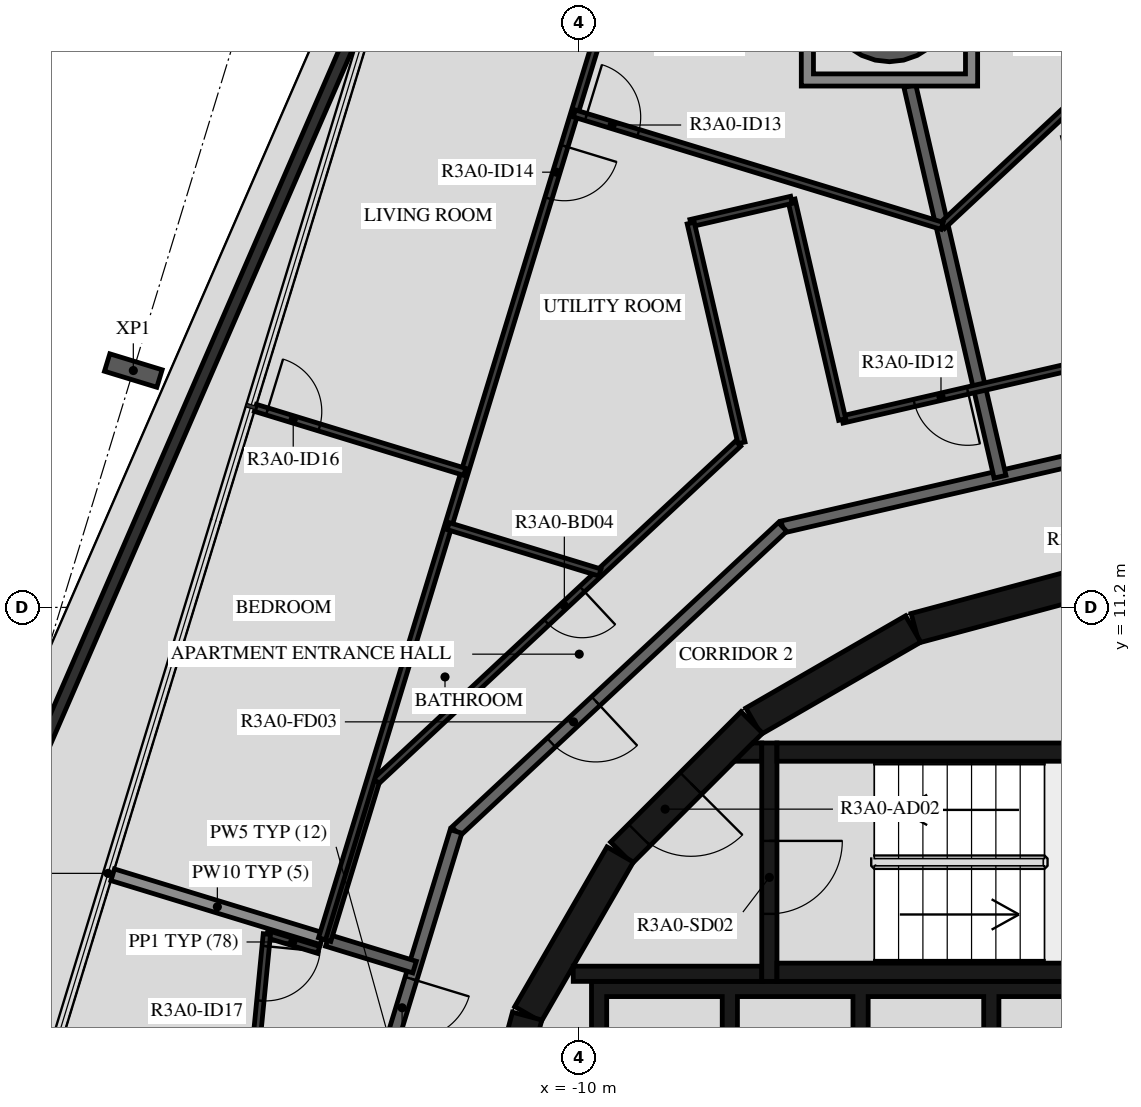
"""IFC4 building model, lengths in metres.
Left out: names, types, materials, properties, quantities, classifications, styles, units other than length and angle.
Written with IfcOpenShell. Run it as: python <this file> out.ifc"""

import sys

from ifc_helpers import new_model, si_unit, direction, frame, frame_2d, origin, origin_2d, place, context, subcontext, project, spatial, polyline, rectangle, hollow_circle, i_section, outline, extrude, element, fill, save


model = new_model("IFC4")
c1 = context("Model", 3, precision=1e-05, world=origin(), true_north=direction((0.0, 1.0)))
c2 = subcontext(c1, "Body", "Model", "MODEL_VIEW")
j1 = project(units=[si_unit("LENGTHUNIT", "METRE"), si_unit("PLANEANGLEUNIT", "RADIAN")], contexts=[c1])
p1 = place(None, origin())
s1 = spatial("IfcSite", under=j1, at=p1, CompositionType="ELEMENT")
p2 = place(p1, origin())
s2 = spatial("IfcBuilding", under=s1, at=p2, CompositionType="ELEMENT")
p3 = place(p2, frame((0.0, 0.0, 113.4)))
s3 = spatial("IfcBuildingStorey", under=s2, at=p3, CompositionType="ELEMENT", Elevation=113.4)
p4 = place(p3, frame((-4.9, 21.223, -0.45), z_axis=(0.0, 0.0, 1.0), x_axis=(1.0, 0.0, 0.0)))
e1 = element("IfcColumn", 1, at=p4, inside=s3, PredefinedType="COLUMN", context=c2, shape_type="SweptSolid", body=[
    extrude(hollow_circle(Radius=1.05, WallThickness=0.05, at=origin_2d()), origin(), (0.0, 0.0, 1.0), 3.57),
])
p5 = place(p3, frame((-17.335, 15.095, -0.45), z_axis=(0.0, 0.0, 1.0), x_axis=(0.29237190653, 0.956304694264, 0.0)))
e2 = element("IfcColumn", 2, at=p5, inside=s3, PredefinedType="COLUMN", context=c2, shape_type="SweptSolid", body=[
    extrude(i_section(OverallWidth=0.3, OverallDepth=0.9, WebThickness=0.019, FlangeThickness=0.035, FilletRadius=0.03, at=origin_2d()), origin(), (0.0, 0.0, 1.0), 3.57),
])
p6 = place(p3, frame((-26.845, -9.558, 0.03), z_axis=(0.0, 0.0, 1.0), x_axis=(0.398491196924, 0.917172157217, 0.0)))
e3 = element("IfcWall", 3, at=p6, inside=s3, PredefinedType="PARAPET", context=c2, shape_type="SweptSolid", body=[
    extrude(rectangle(XDim=35.306, YDim=0.2, at=frame_2d((17.653, 0.0))), origin(), (0.0, 0.0, 1.0), 1.5),
])
for number, where, z_axis, x_axis in (
    (4, (-1.55, 11.643, 0.0), (0.0, 0.0, 1.0), (-0.966, -0.259, 0.0)),
    (5, (-4.51, 10.845, 0.0), (0.0, 0.0, 1.0), (-0.866, -0.5, 0.0)),
):
    element("IfcWall", number, at=place(p3, frame(where, z_axis=z_axis, x_axis=x_axis)), inside=s3, PredefinedType="SHEAR", context=c2, shape_type="SweptSolid", body=[
        extrude(rectangle(XDim=3.033, YDim=0.5, at=frame_2d((1.516, 0.0))), origin(), (0.0, 0.0, 1.0), 3.12),
    ])
p7 = place(p3, frame((-7.164, 9.308, 0.0), z_axis=(0.0, 0.0, 1.0), x_axis=(-0.707106781187, -0.707106781187, 0.0)))
e6 = element("IfcWall", 6, at=p7, inside=s3, PredefinedType="SHEAR", context=c2, shape_type="SweptSolid", body=[
    extrude(rectangle(XDim=3.032, YDim=0.5, at=frame_2d((1.516, 0.0))), origin(), (0.0, 0.0, 1.0), 3.12),
])
p8 = place(p7, frame((1.416, 0.0, 0.0)))
e7 = element("IfcOpeningElement", 7, at=p8, cuts=e6, PredefinedType="OPENING", context=c2, shape_type="SweptSolid", body=[
    extrude(rectangle(XDim=1.2, YDim=2.1, at=frame_2d((0.6, 1.05))), frame((0.0, 0.26, 0.0), z_axis=(0.0, -1.0, 0.0), x_axis=(1.0, 0.0, 0.0)), (0.0, 0.0, 1.0), 0.52),
])
for number, where, z_axis, x_axis in (
    (8, (-9.329, 7.137, 0.0), (0.0, 0.0, 1.0), (-0.5, -0.866, 0.0)),
    (9, (-10.858, 4.479, 0.0), (0.0, 0.0, 1.0), (-0.259, -0.966, 0.0)),
):
    element("IfcWall", number, at=place(p3, frame(where, z_axis=z_axis, x_axis=x_axis)), inside=s3, PredefinedType="SHEAR", context=c2, shape_type="SweptSolid", body=[
        extrude(rectangle(XDim=3.033, YDim=0.5, at=frame_2d((1.516, 0.0))), origin(), (0.0, 0.0, 1.0), 3.12),
    ])
for number, where, z_axis, x_axis in (
    (10, (-6.75, 5.2, 0.0), (0.0, 0.0, 1.0), (1.0, 0.0, 0.0)),
    (11, (-6.75, 8.82, 0.0), (0.0, 0.0, 1.0), (1.0, 0.0, 0.0)),
):
    element("IfcWall", number, at=place(p3, frame(where, z_axis=z_axis, x_axis=x_axis)), inside=s3, PredefinedType="SHEAR", context=c2, shape_type="SweptSolid", body=[
        extrude(rectangle(XDim=6.75, YDim=0.3, at=frame_2d((3.375, 0.0))), origin(), (0.0, 0.0, 1.0), 3.12),
    ])
p9 = place(p3, frame((-6.875, 8.97, 0.0), z_axis=(0.0, 0.0, 1.0), x_axis=(0.0, -1.0, 0.0)))
e12 = element("IfcWall", 12, at=p9, inside=s3, PredefinedType="SHEAR", context=c2, shape_type="SweptSolid", body=[
    extrude(rectangle(XDim=3.92, YDim=0.25, at=frame_2d((1.96, 0.0))), origin(), (0.0, 0.0, 1.0), 3.12),
])
p10 = place(p9, frame((1.61, 0.0, 0.0)))
e13 = element("IfcOpeningElement", 13, at=p10, cuts=e12, PredefinedType="OPENING", context=c2, shape_type="SweptSolid", body=[
    extrude(rectangle(XDim=1.2, YDim=2.1, at=frame_2d((0.6, 1.05))), frame((0.0, 0.135, 0.0), z_axis=(0.0, -1.0, 0.0), x_axis=(1.0, 0.0, 0.0)), (0.0, 0.0, 1.0), 0.27),
])
p11 = place(p3, frame((-7.0, 5.175, 0.0), z_axis=(0.0, 0.0, 1.0), x_axis=(-1.0, 0.0, 0.0)))
e14 = element("IfcWall", 14, at=p11, inside=s3, PredefinedType="SHEAR", context=c2, shape_type="SweptSolid", body=[
    extrude(rectangle(XDim=3.1, YDim=0.25, at=frame_2d((1.55, 0.0))), origin(), (0.0, 0.0, 1.0), 3.12),
])
p12 = place(p3, origin())
e15 = element("IfcWall", 15, at=p12, inside=s3, PredefinedType="SHEAR", context=c2, shape_type="SweptSolid", body=[
    extrude(outline(polyline([(-7.148, 8.97), (-7.0, 8.97), (-7.0, 8.67), (-7.448, 8.67), (-7.148, 8.97)])), origin(), (0.0, 0.0, 1.0), 3.12),
])
p13 = place(p3, origin())
e16 = element("IfcWall", 16, at=p13, inside=s3, PredefinedType="SHEAR", context=c2, shape_type="SweptSolid", body=[
    extrude(outline(polyline([(-9.55, 4.8), (-7.65, 4.8), (-7.65, 1.9), (-7.4, 1.9), (-7.4, 4.8), (-5.5, 4.8), (-5.5, 1.9), (-5.25, 1.9), (-5.25, 4.8), (-3.35, 4.8), (-3.35, 1.9), (-3.1, 1.9), (-3.1, 4.8), (-1.2, 4.8), (-1.2, 1.9), (-0.95, 1.9), (-0.95, 4.8), (0.95, 4.8), (0.95, 1.9), (1.2, 1.9), (1.2, 4.8), (3.1, 4.8), (3.1, 1.9), (3.35, 1.9), (3.35, 4.8), (5.25, 4.8), (5.25, 1.9), (5.5, 1.9), (5.5, 4.8), (7.4, 4.8), (7.4, 1.9), (7.65, 1.9), (7.65, 4.8), (9.55, 4.8), (9.55, 1.9), (9.8, 1.9), (9.8, 4.8), (9.8, 5.05), (-9.8, 5.05), (-9.8, 4.8), (-9.8, 1.9), (-9.55, 1.9), (-9.55, 4.8)])), origin(), (0.0, 0.0, 1.0), 3.12),
])
p14 = place(p3, frame((0.495, 14.175, 0.0), z_axis=(0.0, 0.0, 1.0), x_axis=(-0.974376622151, -0.224922649383, 0.0)))
e17 = element("IfcWall", 17, at=p14, inside=s3, PredefinedType="STANDARD", context=c2, shape_type="SweptSolid", body=[
    extrude(rectangle(XDim=7.342, YDim=0.2, at=frame_2d((3.671, 0.0))), origin(), (0.0, 0.0, 1.0), 3.12),
])
p15 = place(p3, frame((-6.659, 12.523, 0.0), z_axis=(0.0, 0.0, 1.0), x_axis=(-0.731350455479, -0.682001841105, 0.0)))
e18 = element("IfcWall", 18, at=p15, inside=s3, PredefinedType="STANDARD", context=c2, shape_type="SweptSolid", body=[
    extrude(rectangle(XDim=7.342, YDim=0.2, at=frame_2d((3.671, 0.0))), origin(), (0.0, 0.0, 1.0), 3.12),
])
p16 = place(p15, frame((4.2, 0.0, 0.0)))
e19 = element("IfcOpeningElement", 19, at=p16, cuts=e18, PredefinedType="OPENING", context=c2, shape_type="SweptSolid", body=[
    extrude(rectangle(XDim=1.0, YDim=2.1, at=frame_2d((0.5, 1.05))), frame((0.0, 0.11, 0.0), z_axis=(0.0, -1.0, 0.0), x_axis=(1.0, 0.0, 0.0)), (0.0, 0.0, 1.0), 0.22),
])
p17 = place(p3, frame((-12.028, 7.516, 0.0), z_axis=(0.0, 0.0, 1.0), x_axis=(-0.292365533182, -0.956306642771, 0.0)))
e20 = element("IfcWall", 20, at=p17, inside=s3, PredefinedType="STANDARD", context=c2, shape_type="SweptSolid", body=[
    extrude(rectangle(XDim=7.342, YDim=0.2, at=frame_2d((3.671, 0.0))), origin(), (0.0, 0.0, 1.0), 3.12),
])
p18 = place(p17, frame((2.533, 0.0, 0.0)))
e21 = element("IfcOpeningElement", 21, at=p18, cuts=e20, PredefinedType="OPENING", context=c2, shape_type="SweptSolid", body=[
    extrude(rectangle(XDim=1.0, YDim=2.1, at=frame_2d((0.5, 1.05))), frame((0.0, 0.11, 0.0), z_axis=(0.0, -1.0, 0.0), x_axis=(1.0, 0.0, 0.0)), (0.0, 0.0, 1.0), 0.22),
])
p19 = place(p3, frame((-4.565, 19.773, 0.0), z_axis=(0.0, 0.0, 1.0), x_axis=(0.224940633072, -0.974372470667, 0.0)))
e22 = element("IfcWall", 22, at=p19, inside=s3, PredefinedType="STANDARD", context=c2, shape_type="SweptSolid", body=[
    extrude(rectangle(XDim=6.594, YDim=0.2, at=frame_2d((3.297, 0.0))), origin(), (0.0, 0.0, 1.0), 3.12),
])
p20 = place(p3, frame((-14.145, 5.724, 0.0), z_axis=(0.0, 0.0, 1.0), x_axis=(0.956266872747, -0.292495586439, 0.0)))
e23 = element("IfcWall", 23, at=p20, inside=s3, PredefinedType="STANDARD", context=c2, shape_type="SweptSolid", body=[
    extrude(rectangle(XDim=1.5, YDim=0.2, at=frame_2d((0.75, 0.0))), origin(), (0.0, 0.0, 1.0), 3.12),
])
p21 = place(p3, frame((-17.674, 6.803, 0.0), z_axis=(0.0, 0.0, 1.0), x_axis=(0.956293645939, -0.292408041504, 0.0)))
e24 = element("IfcWall", 24, at=p21, inside=s3, PredefinedType="STANDARD", context=c2, shape_type="SweptSolid", body=[
    extrude(rectangle(XDim=3.6, YDim=0.2, at=frame_2d((1.8, 0.0))), origin(), (0.0, 0.0, 1.0), 2.73),
])
p22 = place(p3, frame((-1.161, 15.332, 0.0), z_axis=(0.0, 0.0, 1.0), x_axis=(-0.974373440078, -0.224936433845, 0.0)))
e25 = element("IfcWall", 25, at=p22, inside=s3, PredefinedType="PARTITIONING", context=c2, shape_type="SweptSolid", body=[
    extrude(rectangle(XDim=4.636, YDim=0.12, at=frame_2d((2.318, 0.0))), origin(), (0.0, 0.0, 1.0), 3.12),
])
p23 = place(p22, frame((2.518, 0.0, 0.0)))
e26 = element("IfcOpeningElement", 26, at=p23, cuts=e25, PredefinedType="OPENING", context=c2, shape_type="SweptSolid", body=[
    extrude(rectangle(XDim=0.9, YDim=2.1, at=frame_2d((0.45, 1.05))), frame((0.0, 0.07, 0.0), z_axis=(0.0, -1.0, 0.0), x_axis=(1.0, 0.0, 0.0)), (0.0, 0.0, 1.0), 0.14),
])
p24 = place(p3, frame((0.591, 21.787, 0.0), z_axis=(0.0, 0.0, 1.0), x_axis=(-0.731363296574, -0.681988070588, 0.0)))
e27 = element("IfcWall", 27, at=p24, inside=s3, PredefinedType="PARTITIONING", context=c2, shape_type="SweptSolid", body=[
    extrude(rectangle(XDim=6.324, YDim=0.12, at=frame_2d((3.162, 0.0))), origin(), (0.0, 0.0, 1.0), 3.12),
])
p25 = place(p24, frame((0.6, 0.0, 0.0)))
e28 = element("IfcOpeningElement", 28, at=p25, cuts=e27, PredefinedType="OPENING", context=c2, shape_type="SweptSolid", body=[
    extrude(rectangle(XDim=0.9, YDim=2.1, at=frame_2d((0.45, 1.05))), frame((0.0, 0.07, 0.0), z_axis=(0.0, -1.0, 0.0), x_axis=(1.0, 0.0, 0.0)), (0.0, 0.0, 1.0), 0.14),
])
p26 = place(p3, frame((-5.677, 14.289, 0.0), z_axis=(0.0, 0.0, 1.0), x_axis=(-0.224960478174, 0.974367889075, 0.0)))
e29 = element("IfcWall", 29, at=p26, inside=s3, PredefinedType="PARTITIONING", context=c2, shape_type="SweptSolid", body=[
    extrude(rectangle(XDim=3.708, YDim=0.12, at=frame_2d((1.854, 0.0))), origin(), (0.0, 0.0, 1.0), 3.12),
])
p27 = place(p3, frame((-6.512, 17.902, 0.0), z_axis=(0.0, 0.0, 1.0), x_axis=(-0.974376669418, -0.224922444621, 0.0)))
e30 = element("IfcWall", 30, at=p27, inside=s3, PredefinedType="PARTITIONING", context=c2, shape_type="SweptSolid", body=[
    extrude(rectangle(XDim=1.7, YDim=0.12, at=frame_2d((0.85, 0.0))), origin(), (0.0, 0.0, 1.0), 3.12),
])
p28 = place(p3, frame((-8.168, 17.52, 0.0), z_axis=(0.0, 0.0, 1.0), x_axis=(0.224960478174, -0.974367889075, 0.0)))
e31 = element("IfcWall", 31, at=p28, inside=s3, PredefinedType="PARTITIONING", context=c2, shape_type="SweptSolid", body=[
    extrude(rectangle(XDim=3.708, YDim=0.12, at=frame_2d((1.854, 0.0))), origin(), (0.0, 0.0, 1.0), 3.12),
])
p29 = place(p3, frame((-7.388, 13.894, 0.0), z_axis=(0.0, 0.0, 1.0), x_axis=(-0.731357186721, -0.681994622729, 0.0)))
e32 = element("IfcWall", 32, at=p29, inside=s3, PredefinedType="PARTITIONING", context=c2, shape_type="SweptSolid", body=[
    extrude(rectangle(XDim=8.146, YDim=0.12, at=frame_2d((4.073, 0.0))), origin(), (0.0, 0.0, 1.0), 3.12),
])
p30 = place(p29, frame((3.509, 0.0, 0.0)))
e33 = element("IfcOpeningElement", 33, at=p30, cuts=e32, PredefinedType="OPENING", context=c2, shape_type="SweptSolid", body=[
    extrude(rectangle(XDim=0.8, YDim=2.1, at=frame_2d((0.4, 1.05))), frame((0.0, 0.07, 0.0), z_axis=(0.0, -1.0, 0.0), x_axis=(1.0, 0.0, 0.0)), (0.0, 0.0, 1.0), 0.14),
])
p31 = place(p3, frame((-13.345, 8.339, 0.0), z_axis=(0.0, 0.0, 1.0), x_axis=(-0.292316072367, -0.956321762712, 0.0)))
e34 = element("IfcWall", 34, at=p31, inside=s3, PredefinedType="PARTITIONING", context=c2, shape_type="SweptSolid", body=[
    extrude(rectangle(XDim=2.734, YDim=0.12, at=frame_2d((1.367, 0.0))), origin(), (0.0, 0.0, 1.0), 3.12),
])
p32 = place(p3, frame((-9.169, 22.31, 0.0), z_axis=(0.0, 0.0, 1.0), x_axis=(-0.29236145486, -0.956307889601, 0.0)))
e35 = element("IfcWall", 35, at=p32, inside=s3, PredefinedType="PARTITIONING", context=c2, shape_type="SweptSolid", body=[
    extrude(rectangle(XDim=17.316, YDim=0.12, at=frame_2d((8.658, 0.0))), origin(), (0.0, 0.0, 1.0), 3.12),
])
p33 = place(p32, frame((3.683, 0.0, 0.0)))
e36 = element("IfcOpeningElement", 36, at=p33, cuts=e35, PredefinedType="OPENING", context=c2, shape_type="SweptSolid", body=[
    extrude(rectangle(XDim=0.9, YDim=2.1, at=frame_2d((0.45, 1.05))), frame((0.0, 0.07, 0.0), z_axis=(0.0, -1.0, 0.0), x_axis=(1.0, 0.0, 0.0)), (0.0, 0.0, 1.0), 0.14),
])
p34 = place(p3, frame((-10.082, 19.323, 0.0), z_axis=(0.0, 0.0, 1.0), x_axis=(0.956300011431, -0.292387222936, 0.0)))
e37 = element("IfcWall", 37, at=p34, inside=s3, PredefinedType="PARTITIONING", context=c2, shape_type="SweptSolid", body=[
    extrude(rectangle(XDim=6.324, YDim=0.12, at=frame_2d((3.162, 0.0))), origin(), (0.0, 0.0, 1.0), 3.12),
])
p35 = place(p34, frame((0.2, 0.0, 0.0)))
e38 = element("IfcOpeningElement", 38, at=p35, cuts=e37, PredefinedType="OPENING", context=c2, shape_type="SweptSolid", body=[
    extrude(rectangle(XDim=0.9, YDim=2.1, at=frame_2d((0.45, 1.05))), frame((0.0, 0.07, 0.0), z_axis=(0.0, -1.0, 0.0), x_axis=(1.0, 0.0, 0.0)), (0.0, 0.0, 1.0), 0.14),
])
p36 = place(p3, frame((-12.157, 12.537, 0.0), z_axis=(0.0, 0.0, 1.0), x_axis=(0.956293441844, -0.292408708979, 0.0)))
e39 = element("IfcWall", 39, at=p36, inside=s3, PredefinedType="PARTITIONING", context=c2, shape_type="SweptSolid", body=[
    extrude(rectangle(XDim=2.609, YDim=0.12, at=frame_2d((1.305, 0.0))), origin(), (0.0, 0.0, 1.0), 3.12),
])
p37 = place(p3, frame((-15.327, 14.481, 0.0), z_axis=(0.0, 0.0, 1.0), x_axis=(0.956306810244, -0.292364985388, 0.0)))
e40 = element("IfcWall", 40, at=p37, inside=s3, PredefinedType="PARTITIONING", context=c2, shape_type="SweptSolid", body=[
    extrude(rectangle(XDim=3.6, YDim=0.12, at=frame_2d((1.8, 0.0))), origin(), (0.0, 0.0, 1.0), 2.73),
])
p38 = place(p37, frame((0.2, 0.0, 0.0)))
e41 = element("IfcOpeningElement", 41, at=p38, cuts=e40, PredefinedType="OPENING", context=c2, shape_type="SweptSolid", body=[
    extrude(rectangle(XDim=0.9, YDim=2.1, at=frame_2d((0.45, 1.05))), frame((0.0, 0.07, 0.0), z_axis=(0.0, -1.0, 0.0), x_axis=(1.0, 0.0, 0.0)), (0.0, 0.0, 1.0), 0.14),
])
p39 = place(p3, frame((-14.287, 5.568, 0.0), z_axis=(0.0, 0.0, 1.0), x_axis=(-0.956287662261, 0.292427609859, 0.0)))
e42 = element("IfcWall", 42, at=p39, inside=s3, PredefinedType="PARTITIONING", context=c2, shape_type="SweptSolid", body=[
    extrude(rectangle(XDim=0.89, YDim=0.12, at=frame_2d((0.445, 0.0))), origin(), (0.0, 0.0, 1.0), 3.12),
])
p40 = place(p3, frame((-15.138, 5.828, 0.0), z_axis=(0.0, 0.0, 1.0), x_axis=(-0.096967255409, -0.995287572201, 0.0)))
e43 = element("IfcWall", 43, at=p40, inside=s3, PredefinedType="PARTITIONING", context=c2, shape_type="SweptSolid", body=[
    extrude(rectangle(XDim=4.489, YDim=0.12, at=frame_2d((2.245, 0.0))), origin(), (0.0, 0.0, 1.0), 3.12),
])
p41 = place(p40, frame((0.2, 0.0, 0.0)))
e44 = element("IfcOpeningElement", 44, at=p41, cuts=e43, PredefinedType="OPENING", context=c2, shape_type="SweptSolid", body=[
    extrude(rectangle(XDim=0.9, YDim=2.1, at=frame_2d((0.45, 1.05))), frame((0.0, 0.07, 0.0), z_axis=(0.0, -1.0, 0.0), x_axis=(1.0, 0.0, 0.0)), (0.0, 0.0, 1.0), 0.14),
])
p42 = place(p3, origin())
e45 = element("IfcWall", 45, at=p42, inside=s3, PredefinedType="STANDARD", context=c2, shape_type="SweptSolid", body=[
    extrude(outline(polyline([(-3.45, 22.674), (-3.45, 19.773), (-6.35, 19.773), (-6.35, 22.674), (-3.45, 22.674)]), holes=[polyline([(-6.15, 19.973), (-3.65, 19.973), (-3.65, 22.473), (-6.15, 22.473), (-6.15, 19.973)])]), origin(), (0.0, 0.0, 1.0), 3.12),
])
p43 = place(p10, origin())
e46 = element("IfcDoor", 46, at=p43, inside=s3, OperationType="SINGLE_SWING_LEFT", PredefinedType="DOOR", context=c2, shape_type="SweptSolid", body=[
    extrude(rectangle(XDim=1.2, YDim=2.1, at=frame_2d((0.6, 1.05))), frame((0.0, 0.025, 0.0), z_axis=(0.0, -1.0, 0.0), x_axis=(1.0, 0.0, 0.0)), (0.0, 0.0, 1.0), 0.05),
])
fill(e13, e46)
p44 = place(p8, origin())
e47 = element("IfcDoor", 47, at=p44, inside=s3, OperationType="SINGLE_SWING_RIGHT", PredefinedType="DOOR", context=c2, shape_type="SweptSolid", body=[
    extrude(rectangle(XDim=1.2, YDim=2.1, at=frame_2d((0.6, 1.05))), frame((0.0, 0.025, 0.0), z_axis=(0.0, -1.0, 0.0), x_axis=(1.0, 0.0, 0.0)), (0.0, 0.0, 1.0), 0.05),
])
fill(e7, e47)
p45 = place(p16, origin())
e48 = element("IfcDoor", 48, at=p45, inside=s3, OperationType="SINGLE_SWING_LEFT", PredefinedType="DOOR", context=c2, shape_type="SweptSolid", body=[
    extrude(rectangle(XDim=1.0, YDim=2.1, at=frame_2d((0.5, 1.05))), frame((0.0, 0.025, 0.0), z_axis=(0.0, -1.0, 0.0), x_axis=(1.0, 0.0, 0.0)), (0.0, 0.0, 1.0), 0.05),
])
fill(e19, e48)
p46 = place(p23, origin())
e49 = element("IfcDoor", 49, at=p46, inside=s3, OperationType="SINGLE_SWING_LEFT", PredefinedType="DOOR", context=c2, shape_type="SweptSolid", body=[
    extrude(rectangle(XDim=0.9, YDim=2.1, at=frame_2d((0.45, 1.05))), frame((0.0, 0.025, 0.0), z_axis=(0.0, -1.0, 0.0), x_axis=(1.0, 0.0, 0.0)), (0.0, 0.0, 1.0), 0.05),
])
fill(e26, e49)
p47 = place(p30, origin())
e50 = element("IfcDoor", 50, at=p47, inside=s3, OperationType="SINGLE_SWING_LEFT", PredefinedType="DOOR", context=c2, shape_type="SweptSolid", body=[
    extrude(rectangle(XDim=0.8, YDim=2.1, at=frame_2d((0.4, 1.05))), frame((0.0, 0.025, 0.0), z_axis=(0.0, -1.0, 0.0), x_axis=(1.0, 0.0, 0.0)), (0.0, 0.0, 1.0), 0.05),
])
fill(e33, e50)
p48 = place(p35, origin())
e51 = element("IfcDoor", 51, at=p48, inside=s3, OperationType="SINGLE_SWING_LEFT", PredefinedType="DOOR", context=c2, shape_type="SweptSolid", body=[
    extrude(rectangle(XDim=0.9, YDim=2.1, at=frame_2d((0.45, 1.05))), frame((0.0, 0.025, 0.0), z_axis=(0.0, -1.0, 0.0), x_axis=(1.0, 0.0, 0.0)), (0.0, 0.0, 1.0), 0.05),
])
fill(e38, e51)
p49 = place(p33, origin())
e52 = element("IfcDoor", 52, at=p49, inside=s3, OperationType="SINGLE_SWING_LEFT", PredefinedType="DOOR", context=c2, shape_type="SweptSolid", body=[
    extrude(rectangle(XDim=0.9, YDim=2.1, at=frame_2d((0.45, 1.05))), frame((0.0, 0.025, 0.0), z_axis=(0.0, -1.0, 0.0), x_axis=(1.0, 0.0, 0.0)), (0.0, 0.0, 1.0), 0.05),
])
fill(e36, e52)
p50 = place(p38, origin())
e53 = element("IfcDoor", 53, at=p50, inside=s3, OperationType="SINGLE_SWING_RIGHT", PredefinedType="DOOR", context=c2, shape_type="SweptSolid", body=[
    extrude(rectangle(XDim=0.9, YDim=2.1, at=frame_2d((0.45, 1.05))), frame((0.0, 0.025, 0.0), z_axis=(0.0, -1.0, 0.0), x_axis=(1.0, 0.0, 0.0)), (0.0, 0.0, 1.0), 0.05),
])
fill(e41, e53)
p51 = place(p18, origin())
e54 = element("IfcDoor", 54, at=p51, inside=s3, OperationType="SINGLE_SWING_LEFT", PredefinedType="DOOR", context=c2, shape_type="SweptSolid", body=[
    extrude(rectangle(XDim=1.0, YDim=2.1, at=frame_2d((0.5, 1.05))), frame((0.0, 0.025, 0.0), z_axis=(0.0, -1.0, 0.0), x_axis=(1.0, 0.0, 0.0)), (0.0, 0.0, 1.0), 0.05),
])
fill(e21, e54)
p52 = place(p41, origin())
e55 = element("IfcDoor", 55, at=p52, inside=s3, OperationType="SINGLE_SWING_LEFT", PredefinedType="DOOR", context=c2, shape_type="SweptSolid", body=[
    extrude(rectangle(XDim=0.9, YDim=2.1, at=frame_2d((0.45, 1.05))), frame((0.0, 0.025, 0.0), z_axis=(0.0, -1.0, 0.0), x_axis=(1.0, 0.0, 0.0)), (0.0, 0.0, 1.0), 0.05),
])
fill(e44, e55)
save(model, sys.argv[1])
